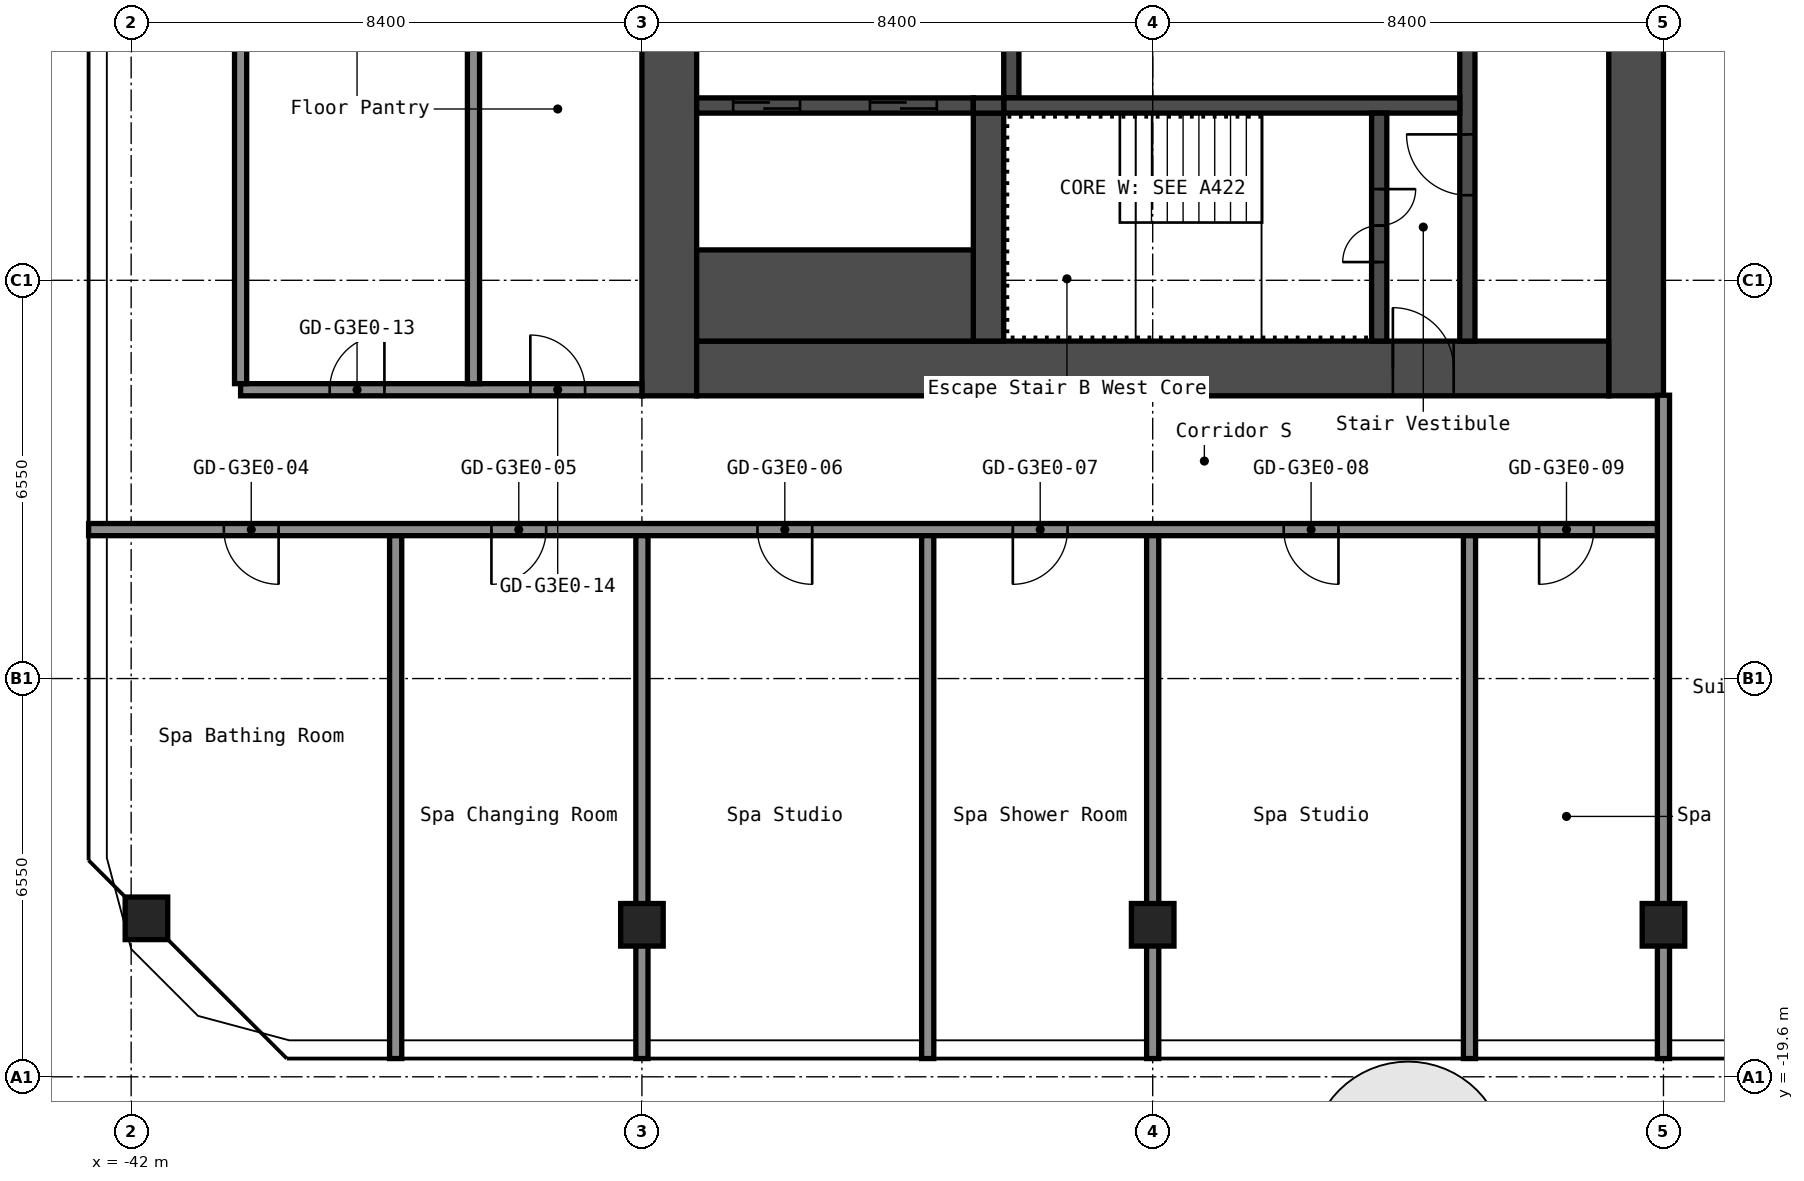
"""IFC4 building model, lengths in metres.
Left out: names, types, materials, properties, quantities, classifications, styles, units other than length and angle.
Written with IfcOpenShell. Run it as: python <this file> out.ifc"""

import sys

from ifc_helpers import new_model, si_unit, direction, frame, frame_2d, origin, origin_2d, place, context, subcontext, project, spatial, rectangle, hollow_rectangle, extrude, element, fill, save


model = new_model("IFC4")
c1 = context("Model", 3, precision=1e-05, world=origin(), true_north=direction((0.0, 1.0)))
c2 = subcontext(c1, "Body", "Model", "MODEL_VIEW")
j1 = project(units=[si_unit("LENGTHUNIT", "METRE"), si_unit("PLANEANGLEUNIT", "RADIAN")], contexts=[c1])
p1 = place(None, origin())
s1 = spatial("IfcSite", under=j1, at=p1, CompositionType="ELEMENT")
p2 = place(p1, origin())
s2 = spatial("IfcBuilding", under=s1, at=p2, CompositionType="ELEMENT")
p3 = place(p2, frame((0.0, 0.0, 143.8)))
s3 = spatial("IfcBuildingStorey", under=s2, at=p3, CompositionType="ELEMENT", Elevation=143.8)
for number, where, z_axis, x_axis in (
    (1, (-41.749, -16.994, 0.0), (0.0, 0.0, 1.0), (1.0, 0.0, 0.0)),
    (2, (-33.6, -17.1, 0.0), (0.0, 0.0, 1.0), (1.0, 0.0, 0.0)),
    (3, (-25.2, -17.1, 0.0), (0.0, 0.0, 1.0), (1.0, 0.0, 0.0)),
    (4, (-16.8, -17.1, 0.0), (0.0, 0.0, 1.0), (1.0, 0.0, 0.0)),
):
    element("IfcColumn", number, at=place(p3, frame(where, z_axis=z_axis, x_axis=x_axis)), inside=s3, PredefinedType="COLUMN", context=c2, shape_type="SweptSolid", body=[
        extrude(hollow_rectangle(XDim=0.7, YDim=0.7, WallThickness=0.028, at=origin_2d()), origin(), (0.0, 0.0, 1.0), 2.75),
    ])
p4 = place(p3, frame((-17.25, -8.4, 0.0), z_axis=(0.0, 0.0, 1.0), x_axis=(0.0, 1.0, 0.0)))
e5 = element("IfcWall", 5, at=p4, inside=s3, PredefinedType="SHEAR", context=c2, shape_type="SweptSolid", body=[
    extrude(rectangle(XDim=16.8, YDim=0.9, at=frame_2d((8.4, 0.0))), origin(), (0.0, 0.0, 1.0), 2.75),
])
p5 = place(p4, frame((7.1, 0.0, 0.0)))
e6 = element("IfcOpeningElement", 6, at=p5, cuts=e5, PredefinedType="OPENING", context=c2, shape_type="SweptSolid", body=[
    extrude(rectangle(XDim=1.6, YDim=2.1, at=frame_2d((0.8, 1.05))), frame((0.0, 0.46, 0.0), z_axis=(0.0, -1.0, 0.0), x_axis=(1.0, 0.0, 0.0)), (0.0, 0.0, 1.0), 0.92),
])
p6 = place(p3, frame((-33.15, -8.4, 0.0), z_axis=(0.0, 0.0, 1.0), x_axis=(0.0, 1.0, 0.0)))
e7 = element("IfcWall", 7, at=p6, inside=s3, PredefinedType="SHEAR", context=c2, shape_type="SweptSolid", body=[
    extrude(rectangle(XDim=16.8, YDim=0.9, at=frame_2d((8.4, 0.0))), origin(), (0.0, 0.0, 1.0), 2.75),
])
p7 = place(p3, frame((-32.7, -7.95, 0.0), z_axis=(0.0, 0.0, 1.0), x_axis=(1.0, 0.0, 0.0)))
e8 = element("IfcWall", 8, at=p7, inside=s3, PredefinedType="SHEAR", context=c2, shape_type="SweptSolid", body=[
    extrude(rectangle(XDim=15.0, YDim=0.9, at=frame_2d((7.5, 0.0))), origin(), (0.0, 0.0, 1.0), 2.75),
])
p8 = place(p7, frame((11.45, 0.0, 0.0)))
e9 = element("IfcOpeningElement", 9, at=p8, cuts=e8, PredefinedType="OPENING", context=c2, shape_type="SweptSolid", body=[
    extrude(rectangle(XDim=1.0, YDim=2.1, at=frame_2d((0.5, 1.05))), frame((0.0, 0.46, 0.0), z_axis=(0.0, -1.0, 0.0), x_axis=(1.0, 0.0, 0.0)), (0.0, 0.0, 1.0), 0.92),
])
p9 = place(p3, frame((-20.025, -7.5, 0.0), z_axis=(0.0, 0.0, 1.0), x_axis=(0.0, 1.0, 0.0)))
e10 = element("IfcWall", 10, at=p9, inside=s3, PredefinedType="SHEAR", context=c2, shape_type="SweptSolid", body=[
    extrude(rectangle(XDim=6.3, YDim=0.25, at=frame_2d((3.15, 0.0))), origin(), (0.0, 0.0, 1.0), 2.75),
])
p10 = place(p9, frame((2.4, 0.0, 0.0)))
e11 = element("IfcOpeningElement", 11, at=p10, cuts=e10, PredefinedType="OPENING", context=c2, shape_type="SweptSolid", body=[
    extrude(rectangle(XDim=1.0, YDim=2.1, at=frame_2d((0.5, 1.05))), frame((0.0, 0.135, 0.0), z_axis=(0.0, -1.0, 0.0), x_axis=(1.0, 0.0, 0.0)), (0.0, 0.0, 1.0), 0.27),
])
p11 = place(p3, frame((-27.525, -3.5, 0.0), z_axis=(0.0, 0.0, 1.0), x_axis=(0.0, 1.0, 0.0)))
e12 = element("IfcWall", 12, at=p11, inside=s3, PredefinedType="SHEAR", context=c2, shape_type="SweptSolid", body=[
    extrude(rectangle(XDim=2.05, YDim=0.25, at=frame_2d((1.025, 0.0))), origin(), (0.0, 0.0, 1.0), 2.75),
])
p12 = place(p3, frame((-27.65, -3.625, 0.0), z_axis=(0.0, 0.0, 1.0), x_axis=(1.0, 0.0, 0.0)))
e13 = element("IfcWall", 13, at=p12, inside=s3, PredefinedType="SHEAR", context=c2, shape_type="SweptSolid", body=[
    extrude(rectangle(XDim=7.5, YDim=0.25, at=frame_2d((3.75, 0.0))), origin(), (0.0, 0.0, 1.0), 2.75),
])
p13 = place(p3, frame((-21.475, -7.5, 0.0), z_axis=(0.0, 0.0, 1.0), x_axis=(0.0, 1.0, 0.0)))
e14 = element("IfcWall", 14, at=p13, inside=s3, PredefinedType="SHEAR", context=c2, shape_type="SweptSolid", body=[
    extrude(rectangle(XDim=3.75, YDim=0.25, at=frame_2d((1.875, 0.0))), origin(), (0.0, 0.0, 1.0), 2.75),
])
p14 = place(p13, frame((1.3, 0.0, 0.0)))
e15 = element("IfcOpeningElement", 15, at=p14, cuts=e14, PredefinedType="OPENING", context=c2, shape_type="SweptSolid", body=[
    extrude(rectangle(XDim=1.2, YDim=2.1, at=frame_2d((0.6, 1.05))), frame((0.0, 0.135, 0.0), z_axis=(0.0, -1.0, 0.0), x_axis=(1.0, 0.0, 0.0)), (0.0, 0.0, 1.0), 0.27),
])
p15 = place(p3, frame((-27.9, -7.5, 0.0), z_axis=(0.0, 0.0, 1.0), x_axis=(0.0, 1.0, 0.0)))
e16 = element("IfcWall", 16, at=p15, inside=s3, PredefinedType="SHEAR", context=c2, shape_type="SweptSolid", body=[
    extrude(rectangle(XDim=3.75, YDim=0.5, at=frame_2d((1.875, 0.0))), origin(), (0.0, 0.0, 1.0), 2.75),
])
p16 = place(p3, frame((-32.7, -3.625, 0.0), z_axis=(0.0, 0.0, 1.0), x_axis=(1.0, 0.0, 0.0)))
e17 = element("IfcWall", 17, at=p16, inside=s3, PredefinedType="SHEAR", context=c2, shape_type="SweptSolid", body=[
    extrude(rectangle(XDim=4.55, YDim=0.25, at=frame_2d((2.275, 0.0))), origin(), (0.0, 0.0, 1.0), 2.75),
])
p17 = place(p16, frame((2.85, 0.0, 0.0)))
e18 = element("IfcOpeningElement", 18, at=p17, cuts=e17, PredefinedType="OPENING", context=c2, shape_type="SweptSolid", body=[
    extrude(rectangle(XDim=1.1, YDim=2.1, at=frame_2d((0.55, 1.05))), frame((0.0, 0.135, 0.0), z_axis=(0.0, -1.0, 0.0), x_axis=(1.0, 0.0, 0.0)), (0.0, 0.0, 1.0), 0.27),
])
p18 = place(p16, frame((0.6, 0.0, 0.0)))
e19 = element("IfcOpeningElement", 19, at=p18, cuts=e17, PredefinedType="OPENING", context=c2, shape_type="SweptSolid", body=[
    extrude(rectangle(XDim=1.1, YDim=2.1, at=frame_2d((0.55, 1.05))), frame((0.0, 0.135, 0.0), z_axis=(0.0, -1.0, 0.0), x_axis=(1.0, 0.0, 0.0)), (0.0, 0.0, 1.0), 0.27),
])
p19 = place(p3, frame((-32.7, -6.75, 0.0), z_axis=(0.0, 0.0, 1.0), x_axis=(1.0, 0.0, 0.0)))
e20 = element("IfcWall", 20, at=p19, inside=s3, PredefinedType="SHEAR", context=c2, shape_type="SweptSolid", body=[
    extrude(rectangle(XDim=4.55, YDim=1.5, at=frame_2d((2.275, 0.0))), origin(), (0.0, 0.0, 1.0), 2.75),
])
p20 = place(p3, frame((-28.15, -3.625, 0.0), z_axis=(0.0, 0.0, 1.0), x_axis=(1.0, 0.0, 0.0)))
e21 = element("IfcWall", 21, at=p20, inside=s3, PredefinedType="SHEAR", context=c2, shape_type="SweptSolid", body=[
    extrude(rectangle(XDim=0.5, YDim=0.25, at=frame_2d((0.25, 0.0))), origin(), (0.0, 0.0, 1.0), 2.75),
])
p21 = place(p3, frame((-42.7, -10.6, 0.0), z_axis=(0.0, 0.0, 1.0), x_axis=(1.0, 0.0, 0.0)))
e22 = element("IfcWall", 22, at=p21, inside=s3, PredefinedType="PARTITIONING", context=c2, shape_type="SweptSolid", body=[
    extrude(rectangle(XDim=25.9, YDim=0.2, at=frame_2d((12.95, 0.0))), origin(), (0.0, 0.0, 1.0), 2.75),
])
p22 = place(p21, frame((2.225, 0.0, 0.0)))
e23 = element("IfcOpeningElement", 23, at=p22, cuts=e22, PredefinedType="OPENING", context=c2, shape_type="SweptSolid", body=[
    extrude(rectangle(XDim=0.9, YDim=2.1, at=frame_2d((0.45, 1.05))), frame((0.0, 0.11, 0.0), z_axis=(0.0, -1.0, 0.0), x_axis=(1.0, 0.0, 0.0)), (0.0, 0.0, 1.0), 0.22),
])
p23 = place(p21, frame((6.625, 0.0, 0.0)))
e24 = element("IfcOpeningElement", 24, at=p23, cuts=e22, PredefinedType="OPENING", context=c2, shape_type="SweptSolid", body=[
    extrude(rectangle(XDim=0.9, YDim=2.1, at=frame_2d((0.45, 1.05))), frame((0.0, 0.11, 0.0), z_axis=(0.0, -1.0, 0.0), x_axis=(1.0, 0.0, 0.0)), (0.0, 0.0, 1.0), 0.22),
])
p24 = place(p21, frame((11.0, 0.0, 0.0)))
e25 = element("IfcOpeningElement", 25, at=p24, cuts=e22, PredefinedType="OPENING", context=c2, shape_type="SweptSolid", body=[
    extrude(rectangle(XDim=0.9, YDim=2.1, at=frame_2d((0.45, 1.05))), frame((0.0, 0.11, 0.0), z_axis=(0.0, -1.0, 0.0), x_axis=(1.0, 0.0, 0.0)), (0.0, 0.0, 1.0), 0.22),
])
p25 = place(p21, frame((15.2, 0.0, 0.0)))
e26 = element("IfcOpeningElement", 26, at=p25, cuts=e22, PredefinedType="OPENING", context=c2, shape_type="SweptSolid", body=[
    extrude(rectangle(XDim=0.9, YDim=2.1, at=frame_2d((0.45, 1.05))), frame((0.0, 0.11, 0.0), z_axis=(0.0, -1.0, 0.0), x_axis=(1.0, 0.0, 0.0)), (0.0, 0.0, 1.0), 0.22),
])
p26 = place(p21, frame((19.655, 0.0, 0.0)))
e27 = element("IfcOpeningElement", 27, at=p26, cuts=e22, PredefinedType="OPENING", context=c2, shape_type="SweptSolid", body=[
    extrude(rectangle(XDim=0.9, YDim=2.1, at=frame_2d((0.45, 1.05))), frame((0.0, 0.11, 0.0), z_axis=(0.0, -1.0, 0.0), x_axis=(1.0, 0.0, 0.0)), (0.0, 0.0, 1.0), 0.22),
])
p27 = place(p21, frame((23.855, 0.0, 0.0)))
e28 = element("IfcOpeningElement", 28, at=p27, cuts=e22, PredefinedType="OPENING", context=c2, shape_type="SweptSolid", body=[
    extrude(rectangle(XDim=0.9, YDim=2.1, at=frame_2d((0.45, 1.05))), frame((0.0, 0.11, 0.0), z_axis=(0.0, -1.0, 0.0), x_axis=(1.0, 0.0, 0.0)), (0.0, 0.0, 1.0), 0.22),
])
p28 = place(p3, frame((-40.2, -8.3, 0.0), z_axis=(0.0, 0.0, 1.0), x_axis=(1.0, 0.0, 0.0)))
e29 = element("IfcWall", 29, at=p28, inside=s3, PredefinedType="PARTITIONING", context=c2, shape_type="SweptSolid", body=[
    extrude(rectangle(XDim=6.6, YDim=0.2, at=frame_2d((3.3, 0.0))), origin(), (0.0, 0.0, 1.0), 2.75),
])
p29 = place(p28, frame((1.465, 0.0, 0.0)))
e30 = element("IfcOpeningElement", 30, at=p29, cuts=e29, PredefinedType="OPENING", context=c2, shape_type="SweptSolid", body=[
    extrude(rectangle(XDim=0.9, YDim=2.1, at=frame_2d((0.45, 1.05))), frame((0.0, 0.11, 0.0), z_axis=(0.0, -1.0, 0.0), x_axis=(1.0, 0.0, 0.0)), (0.0, 0.0, 1.0), 0.22),
])
p30 = place(p28, frame((4.765, 0.0, 0.0)))
e31 = element("IfcOpeningElement", 31, at=p30, cuts=e29, PredefinedType="OPENING", context=c2, shape_type="SweptSolid", body=[
    extrude(rectangle(XDim=0.9, YDim=2.1, at=frame_2d((0.45, 1.05))), frame((0.0, 0.11, 0.0), z_axis=(0.0, -1.0, 0.0), x_axis=(1.0, 0.0, 0.0)), (0.0, 0.0, 1.0), 0.22),
])
p31 = place(p3, frame((-40.2, -8.2, 0.0), z_axis=(0.0, 0.0, 1.0), x_axis=(0.0, 1.0, 0.0)))
e32 = element("IfcWall", 32, at=p31, inside=s3, PredefinedType="PARTITIONING", context=c2, shape_type="SweptSolid", body=[
    extrude(rectangle(XDim=16.4, YDim=0.2, at=frame_2d((8.2, 0.0))), origin(), (0.0, 0.0, 1.0), 2.75),
])
p32 = place(p3, frame((-37.65, -19.3, 0.0), z_axis=(0.0, 0.0, 1.0), x_axis=(0.0, 1.0, 0.0)))
e33 = element("IfcWall", 33, at=p32, inside=s3, PredefinedType="PARTITIONING", context=c2, shape_type="SweptSolid", body=[
    extrude(rectangle(XDim=8.6, YDim=0.2, at=frame_2d((4.3, 0.0))), origin(), (0.0, 0.0, 1.0), 2.75),
])
p33 = place(p3, frame((-36.37, -8.2, 0.0), z_axis=(0.0, 0.0, 1.0), x_axis=(0.0, 1.0, 0.0)))
e34 = element("IfcWall", 34, at=p33, inside=s3, PredefinedType="PARTITIONING", context=c2, shape_type="SweptSolid", body=[
    extrude(rectangle(XDim=8.2, YDim=0.2, at=frame_2d((4.1, 0.0))), origin(), (0.0, 0.0, 1.0), 2.75),
])
for number, where, z_axis, x_axis in (
    (35, (-33.6, -19.3, 0.0), (0.0, 0.0, 1.0), (0.0, 1.0, 0.0)),
    (36, (-28.9, -19.3, 0.0), (0.0, 0.0, 1.0), (0.0, 1.0, 0.0)),
    (37, (-25.2, -19.3, 0.0), (0.0, 0.0, 1.0), (0.0, 1.0, 0.0)),
    (38, (-19.99, -19.3, 0.0), (0.0, 0.0, 1.0), (0.0, 1.0, 0.0)),
):
    element("IfcWall", number, at=place(p3, frame(where, z_axis=z_axis, x_axis=x_axis)), inside=s3, PredefinedType="PARTITIONING", context=c2, shape_type="SweptSolid", body=[
        extrude(rectangle(XDim=8.6, YDim=0.2, at=frame_2d((4.3, 0.0))), origin(), (0.0, 0.0, 1.0), 2.75),
    ])
p34 = place(p3, frame((-16.8, -19.3, 0.0), z_axis=(0.0, 0.0, 1.0), x_axis=(0.0, 1.0, 0.0)))
e39 = element("IfcWall", 39, at=p34, inside=s3, PredefinedType="PARTITIONING", context=c2, shape_type="SweptSolid", body=[
    extrude(rectangle(XDim=10.91, YDim=0.2, at=frame_2d((5.455, 0.0))), origin(), (0.0, 0.0, 1.0), 2.75),
])
p35 = place(p8, origin())
e40 = element("IfcDoor", 40, at=p35, inside=s3, OperationType="SINGLE_SWING_RIGHT", PredefinedType="DOOR", context=c2, shape_type="SweptSolid", body=[
    extrude(rectangle(XDim=1.0, YDim=2.1, at=frame_2d((0.5, 1.05))), frame((0.0, 0.025, 0.0), z_axis=(0.0, -1.0, 0.0), x_axis=(1.0, 0.0, 0.0)), (0.0, 0.0, 1.0), 0.05),
])
fill(e9, e40)
p36 = place(p14, origin())
e41 = element("IfcDoor", 41, at=p36, inside=s3, OperationType="DOUBLE_DOOR_SINGLE_SWING", PredefinedType="DOOR", context=c2, shape_type="SweptSolid", body=[
    extrude(rectangle(XDim=1.2, YDim=2.1, at=frame_2d((0.6, 1.05))), frame((0.0, 0.025, 0.0), z_axis=(0.0, -1.0, 0.0), x_axis=(1.0, 0.0, 0.0)), (0.0, 0.0, 1.0), 0.05),
])
fill(e15, e41)
p37 = place(p10, origin())
e42 = element("IfcDoor", 42, at=p37, inside=s3, OperationType="SINGLE_SWING_LEFT", PredefinedType="DOOR", context=c2, shape_type="SweptSolid", body=[
    extrude(rectangle(XDim=1.0, YDim=2.1, at=frame_2d((0.5, 1.05))), frame((0.0, 0.025, 0.0), z_axis=(0.0, -1.0, 0.0), x_axis=(1.0, 0.0, 0.0)), (0.0, 0.0, 1.0), 0.05),
])
fill(e11, e42)
p38 = place(p17, origin())
e43 = element("IfcDoor", 43, at=p38, inside=s3, OperationType="DOUBLE_DOOR_SLIDING", PredefinedType="DOOR", context=c2, shape_type="SweptSolid", body=[
    extrude(rectangle(XDim=1.1, YDim=2.1, at=frame_2d((0.55, 1.05))), frame((0.0, 0.025, 0.0), z_axis=(0.0, -1.0, 0.0), x_axis=(1.0, 0.0, 0.0)), (0.0, 0.0, 1.0), 0.05),
])
fill(e18, e43)
p39 = place(p18, origin())
e44 = element("IfcDoor", 44, at=p39, inside=s3, OperationType="DOUBLE_DOOR_SLIDING", PredefinedType="DOOR", context=c2, shape_type="SweptSolid", body=[
    extrude(rectangle(XDim=1.1, YDim=2.1, at=frame_2d((0.55, 1.05))), frame((0.0, 0.025, 0.0), z_axis=(0.0, -1.0, 0.0), x_axis=(1.0, 0.0, 0.0)), (0.0, 0.0, 1.0), 0.05),
])
fill(e19, e44)
p40 = place(p22, origin())
e45 = element("IfcDoor", 45, at=p40, inside=s3, OperationType="SINGLE_SWING_RIGHT", PredefinedType="DOOR", context=c2, shape_type="SweptSolid", body=[
    extrude(rectangle(XDim=0.9, YDim=2.1, at=frame_2d((0.45, 1.05))), frame((0.0, 0.025, 0.0), z_axis=(0.0, -1.0, 0.0), x_axis=(1.0, 0.0, 0.0)), (0.0, 0.0, 1.0), 0.05),
])
fill(e23, e45)
p41 = place(p23, origin())
e46 = element("IfcDoor", 46, at=p41, inside=s3, OperationType="SINGLE_SWING_LEFT", PredefinedType="DOOR", context=c2, shape_type="SweptSolid", body=[
    extrude(rectangle(XDim=0.9, YDim=2.1, at=frame_2d((0.45, 1.05))), frame((0.0, 0.025, 0.0), z_axis=(0.0, -1.0, 0.0), x_axis=(1.0, 0.0, 0.0)), (0.0, 0.0, 1.0), 0.05),
])
fill(e24, e46)
p42 = place(p24, origin())
e47 = element("IfcDoor", 47, at=p42, inside=s3, OperationType="SINGLE_SWING_RIGHT", PredefinedType="DOOR", context=c2, shape_type="SweptSolid", body=[
    extrude(rectangle(XDim=0.9, YDim=2.1, at=frame_2d((0.45, 1.05))), frame((0.0, 0.025, 0.0), z_axis=(0.0, -1.0, 0.0), x_axis=(1.0, 0.0, 0.0)), (0.0, 0.0, 1.0), 0.05),
])
fill(e25, e47)
p43 = place(p25, origin())
e48 = element("IfcDoor", 48, at=p43, inside=s3, OperationType="SINGLE_SWING_LEFT", PredefinedType="DOOR", context=c2, shape_type="SweptSolid", body=[
    extrude(rectangle(XDim=0.9, YDim=2.1, at=frame_2d((0.45, 1.05))), frame((0.0, 0.025, 0.0), z_axis=(0.0, -1.0, 0.0), x_axis=(1.0, 0.0, 0.0)), (0.0, 0.0, 1.0), 0.05),
])
fill(e26, e48)
p44 = place(p26, origin())
e49 = element("IfcDoor", 49, at=p44, inside=s3, OperationType="SINGLE_SWING_RIGHT", PredefinedType="DOOR", context=c2, shape_type="SweptSolid", body=[
    extrude(rectangle(XDim=0.9, YDim=2.1, at=frame_2d((0.45, 1.05))), frame((0.0, 0.025, 0.0), z_axis=(0.0, -1.0, 0.0), x_axis=(1.0, 0.0, 0.0)), (0.0, 0.0, 1.0), 0.05),
])
fill(e27, e49)
p45 = place(p27, origin())
e50 = element("IfcDoor", 50, at=p45, inside=s3, OperationType="SINGLE_SWING_LEFT", PredefinedType="DOOR", context=c2, shape_type="SweptSolid", body=[
    extrude(rectangle(XDim=0.9, YDim=2.1, at=frame_2d((0.45, 1.05))), frame((0.0, 0.025, 0.0), z_axis=(0.0, -1.0, 0.0), x_axis=(1.0, 0.0, 0.0)), (0.0, 0.0, 1.0), 0.05),
])
fill(e28, e50)
p46 = place(p29, origin())
e51 = element("IfcDoor", 51, at=p46, inside=s3, OperationType="SINGLE_SWING_LEFT", PredefinedType="DOOR", context=c2, shape_type="SweptSolid", body=[
    extrude(rectangle(XDim=0.9, YDim=2.1, at=frame_2d((0.45, 1.05))), frame((0.0, 0.025, 0.0), z_axis=(0.0, -1.0, 0.0), x_axis=(1.0, 0.0, 0.0)), (0.0, 0.0, 1.0), 0.05),
])
fill(e30, e51)
p47 = place(p30, origin())
e52 = element("IfcDoor", 52, at=p47, inside=s3, OperationType="SINGLE_SWING_RIGHT", PredefinedType="DOOR", context=c2, shape_type="SweptSolid", body=[
    extrude(rectangle(XDim=0.9, YDim=2.1, at=frame_2d((0.45, 1.05))), frame((0.0, 0.025, 0.0), z_axis=(0.0, -1.0, 0.0), x_axis=(1.0, 0.0, 0.0)), (0.0, 0.0, 1.0), 0.05),
])
fill(e31, e52)
save(model, sys.argv[1])
